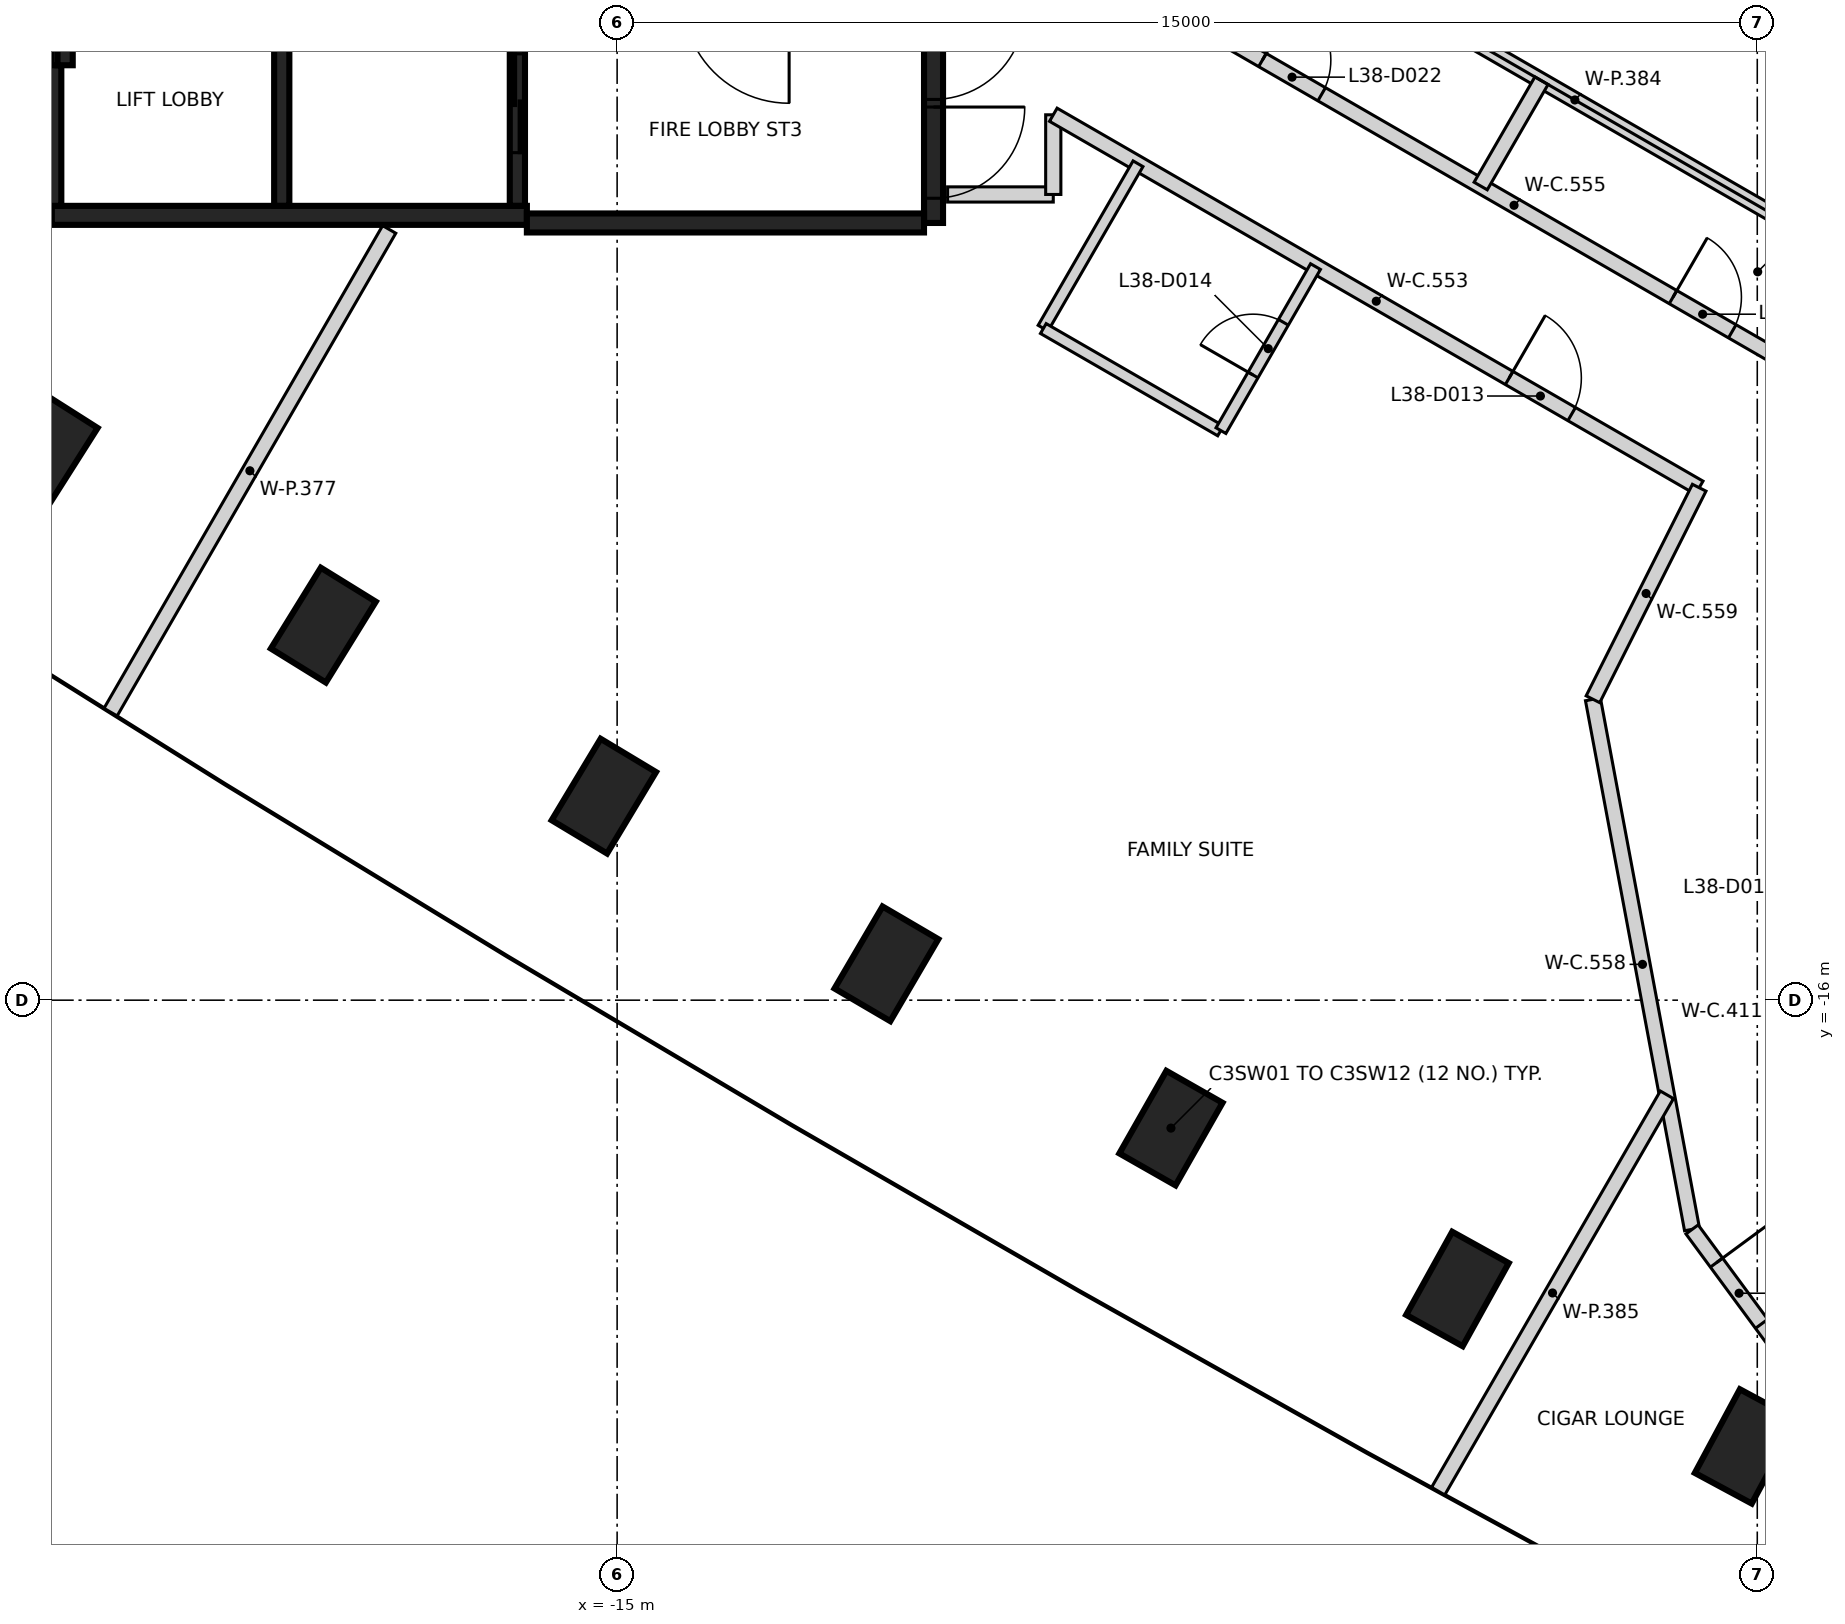
"""IFC4 building model, lengths in metres.
Left out: names, types, materials, properties, quantities, classifications, styles, units other than length and angle.
Written with IfcOpenShell. Run it as: python <this file> out.ifc"""

import sys

from ifc_helpers import new_model, si_unit, direction, frame, frame_2d, origin, origin_2d, place, context, subcontext, project, spatial, rectangle, extrude, element, fill, save


model = new_model("IFC4")
c1 = context("Model", 3, precision=1e-05, world=origin(), true_north=direction((0.0, 1.0)))
c2 = subcontext(c1, "Body", "Model", "MODEL_VIEW")
j1 = project(units=[si_unit("LENGTHUNIT", "METRE"), si_unit("PLANEANGLEUNIT", "RADIAN")], contexts=[c1])
p1 = place(None, origin())
s1 = spatial("IfcSite", under=j1, at=p1, CompositionType="ELEMENT")
p2 = place(p1, origin())
s2 = spatial("IfcBuilding", under=s1, at=p2, CompositionType="ELEMENT")
p3 = place(p2, frame((0.0, 0.0, 154.0)))
s3 = spatial("IfcBuildingStorey", under=s2, at=p3, CompositionType="ELEMENT", Elevation=154.0)
for number, where, z_axis, x_axis in (
    (1, (-22.529, -8.772, -0.4), (0.0, 0.0, 1.0), (0.536, 0.844, 0.0)),
    (2, (-18.865, -11.066, -0.4), (0.0, 0.0, 1.0), (0.526, 0.851, 0.0)),
    (3, (-15.175, -13.316, -0.4), (0.0, 0.0, 1.0), (0.515, 0.857, 0.0)),
    (4, (-11.457, -15.522, -0.4), (0.0, 0.0, 1.0), (0.505, 0.863, 0.0)),
    (5, (-7.714, -17.683, -0.4), (0.0, 0.0, 1.0), (0.495, 0.869, 0.0)),
    (6, (-3.945, -19.8, -0.4), (0.0, 0.0, 1.0), (0.485, 0.875, 0.0)),
    (7, (-0.151, -21.871, -0.4), (0.0, 0.0, 1.0), (0.474, 0.881, 0.0)),
):
    element("IfcColumn", number, at=place(p3, frame(where, z_axis=z_axis, x_axis=x_axis)), inside=s3, PredefinedType="COLUMN", context=c2, shape_type="SweptSolid", body=[
        extrude(rectangle(XDim=1.25, YDim=0.85, at=origin_2d()), origin(), (0.0, 0.0, 1.0), 3.6),
    ])
p4 = place(p3, frame((-10.837, 5.775, 0.0), z_axis=(0.0, 0.0, 1.0), x_axis=(0.0, -1.0, 0.0)))
e8 = element("IfcWall", 8, at=p4, inside=s3, PredefinedType="SHEAR", context=c2, shape_type="SweptSolid", body=[
    extrude(rectangle(XDim=11.55, YDim=0.25, at=frame_2d((5.775, 0.0))), origin(), (0.0, 0.0, 1.0), 3.2),
])
p5 = place(p4, frame((10.025, 0.0, 0.0)))
e9 = element("IfcOpeningElement", 9, at=p5, cuts=e8, PredefinedType="OPENING", context=c2, shape_type="SweptSolid", body=[
    extrude(rectangle(XDim=1.2, YDim=2.1, at=frame_2d((0.6, 1.05))), frame((0.0, 0.135, 0.0), z_axis=(0.0, -1.0, 0.0), x_axis=(1.0, 0.0, 0.0)), (0.0, 0.0, 1.0), 0.27),
])
p6 = place(p4, frame((8.725, 0.0, 0.0)))
e10 = element("IfcOpeningElement", 10, at=p6, cuts=e8, PredefinedType="OPENING", context=c2, shape_type="SweptSolid", body=[
    extrude(rectangle(XDim=1.2, YDim=2.1, at=frame_2d((0.6, 1.05))), frame((0.0, 0.135, 0.0), z_axis=(0.0, -1.0, 0.0), x_axis=(1.0, 0.0, 0.0)), (0.0, 0.0, 1.0), 0.27),
])
p7 = place(p3, frame((-16.187, -5.675, 0.0), z_axis=(0.0, 0.0, 1.0), x_axis=(-1.0, 0.0, 0.0)))
e11 = element("IfcWall", 11, at=p7, inside=s3, PredefinedType="SHEAR", context=c2, shape_type="SweptSolid", body=[
    extrude(rectangle(XDim=6.25, YDim=0.25, at=frame_2d((3.125, 0.0))), origin(), (0.0, 0.0, 1.0), 3.2),
])
p8 = place(p3, frame((-10.963, -5.775, 0.0), z_axis=(0.0, 0.0, 1.0), x_axis=(-1.0, 0.0, 0.0)))
e12 = element("IfcWall", 12, at=p8, inside=s3, PredefinedType="SHEAR", context=c2, shape_type="SweptSolid", body=[
    extrude(rectangle(XDim=5.225, YDim=0.25, at=frame_2d((2.612, 0.0))), origin(), (0.0, 0.0, 1.0), 3.2),
])
p9 = place(p3, frame((-22.437, -5.55, 0.0), z_axis=(0.0, 0.0, 1.0), x_axis=(0.0, 1.0, 0.0)))
e13 = element("IfcWall", 13, at=p9, inside=s3, PredefinedType="SHEAR", context=c2, shape_type="SweptSolid", body=[
    extrude(rectangle(XDim=1.849, YDim=0.25, at=frame_2d((0.925, 0.0))), origin(), (0.0, 0.0, 1.0), 3.2),
])
p10 = place(p3, frame((-22.262, 2.4, 0.0), z_axis=(0.0, 0.0, 1.0), x_axis=(0.0, -1.0, 0.0)))
e14 = element("IfcWall", 14, at=p10, inside=s3, PredefinedType="SHEAR", context=c2, shape_type="SweptSolid", body=[
    extrude(rectangle(XDim=6.1, YDim=0.2, at=frame_2d((3.05, 0.0))), origin(), (0.0, 0.0, 1.0), 3.2),
])
p11 = place(p3, frame((-16.312, -2.898, 0.0), z_axis=(0.0, 0.0, 1.0), x_axis=(0.0, -1.0, 0.0)))
e15 = element("IfcWall", 15, at=p11, inside=s3, PredefinedType="SHEAR", context=c2, shape_type="SweptSolid", body=[
    extrude(rectangle(XDim=2.651, YDim=0.2, at=frame_2d((1.325, 0.0))), origin(), (0.0, 0.0, 1.0), 3.2),
])
p12 = place(p11, frame((0.652, 0.0, 0.0)))
e16 = element("IfcOpeningElement", 16, at=p12, cuts=e15, PredefinedType="OPENING", context=c2, shape_type="SweptSolid", body=[
    extrude(rectangle(XDim=1.3, YDim=2.1, at=frame_2d((0.65, 1.05))), frame((0.0, 0.11, 0.0), z_axis=(0.0, -1.0, 0.0), x_axis=(1.0, 0.0, 0.0)), (0.0, 0.0, 1.0), 0.22),
])
p13 = place(p3, frame((-19.412, -5.549, 0.0), z_axis=(0.0, 0.0, 1.0), x_axis=(0.0, 1.0, 0.0)))
e17 = element("IfcWall", 17, at=p13, inside=s3, PredefinedType="SHEAR", context=c2, shape_type="SweptSolid", body=[
    extrude(rectangle(XDim=2.651, YDim=0.2, at=frame_2d((1.325, 0.0))), origin(), (0.0, 0.0, 1.0), 3.2),
])
p14 = place(p3, frame((-10.652, -5.4, 0.0), z_axis=(0.0, 0.0, 1.0), x_axis=(1.0, 0.0, 0.0)))
e18 = element("IfcWall", 18, at=p14, inside=s3, PredefinedType="PARTITIONING", context=c2, shape_type="SweptSolid", body=[
    extrude(rectangle(XDim=1.39, YDim=0.2, at=frame_2d((0.695, 0.0))), origin(), (0.0, 0.0, 1.0), 3.2),
])
p15 = place(p3, frame((-9.262, -5.4, 0.0), z_axis=(0.0, 0.0, 1.0), x_axis=(0.0, 1.0, 0.0)))
e19 = element("IfcWall", 19, at=p15, inside=s3, PredefinedType="PARTITIONING", context=c2, shape_type="SweptSolid", body=[
    extrude(rectangle(XDim=1.048, YDim=0.2, at=frame_2d((0.524, 0.0))), origin(), (0.0, 0.0, 1.0), 3.2),
])
p16 = place(p3, frame((-9.261, -4.351, 0.0), z_axis=(0.0, 0.0, 1.0), x_axis=(0.865985037707, -0.500069909581, 0.0)))
e20 = element("IfcWall", 20, at=p16, inside=s3, PredefinedType="PARTITIONING", context=c2, shape_type="SweptSolid", body=[
    extrude(rectangle(XDim=9.812, YDim=0.2, at=frame_2d((4.906, 0.0))), origin(), (0.0, 0.0, 1.0), 3.2),
])
p17 = place(p16, frame((6.925, 0.0, 0.0)))
e21 = element("IfcOpeningElement", 21, at=p17, cuts=e20, PredefinedType="OPENING", context=c2, shape_type="SweptSolid", body=[
    extrude(rectangle(XDim=0.95, YDim=2.1, at=frame_2d((0.475, 1.05))), frame((0.0, 0.11, 0.0), z_axis=(0.0, -1.0, 0.0), x_axis=(1.0, 0.0, 0.0)), (0.0, 0.0, 1.0), 0.22),
])
p18 = place(p3, frame((-8.612, -2.418, 0.0), z_axis=(0.0, 0.0, 1.0), x_axis=(0.866023916678, -0.500002575735, 0.0)))
e22 = element("IfcWall", 22, at=p18, inside=s3, PredefinedType="PARTITIONING", context=c2, shape_type="SweptSolid", body=[
    extrude(rectangle(XDim=12.499, YDim=0.2, at=frame_2d((6.249, 0.0))), origin(), (0.0, 0.0, 1.0), 3.2),
])
p19 = place(p18, frame((2.427, 0.0, 0.0)))
e23 = element("IfcOpeningElement", 23, at=p19, cuts=e22, PredefinedType="OPENING", context=c2, shape_type="SweptSolid", body=[
    extrude(rectangle(XDim=0.9, YDim=2.1, at=frame_2d((0.45, 1.05))), frame((0.0, 0.11, 0.0), z_axis=(0.0, -1.0, 0.0), x_axis=(1.0, 0.0, 0.0)), (0.0, 0.0, 1.0), 0.22),
])
p20 = place(p18, frame((8.665, 0.0, 0.0)))
e24 = element("IfcOpeningElement", 24, at=p20, cuts=e22, PredefinedType="OPENING", context=c2, shape_type="SweptSolid", body=[
    extrude(rectangle(XDim=0.9, YDim=2.1, at=frame_2d((0.45, 1.05))), frame((0.0, 0.11, 0.0), z_axis=(0.0, -1.0, 0.0), x_axis=(1.0, 0.0, 0.0)), (0.0, 0.0, 1.0), 0.22),
])
p21 = place(p3, frame((-2.162, -12.042, 0.0), z_axis=(0.0, 0.0, 1.0), x_axis=(0.18377734651, -0.982967897192, 0.0)))
e25 = element("IfcWall", 25, at=p21, inside=s3, PredefinedType="PARTITIONING", context=c2, shape_type="SweptSolid", body=[
    extrude(rectangle(XDim=7.094, YDim=0.2, at=frame_2d((3.547, 0.0))), origin(), (0.0, 0.0, 1.0), 3.2),
])
p22 = place(p3, frame((-2.162, -12.041, 0.0), z_axis=(0.0, 0.0, 1.0), x_axis=(0.448937335771, 0.893563242614, 0.0)))
e26 = element("IfcWall", 26, at=p22, inside=s3, PredefinedType="PARTITIONING", context=c2, shape_type="SweptSolid", body=[
    extrude(rectangle(XDim=3.115, YDim=0.2, at=frame_2d((1.557, 0.0))), origin(), (0.0, 0.0, 1.0), 3.2),
])
p23 = place(p3, frame((-0.858, -19.016, 0.0), z_axis=(0.0, 0.0, 1.0), x_axis=(0.593123867414, -0.805111220829, 0.0)))
e27 = element("IfcWall", 27, at=p23, inside=s3, PredefinedType="PARTITIONING", context=c2, shape_type="SweptSolid", body=[
    extrude(rectangle(XDim=2.77, YDim=0.2, at=frame_2d((1.385, 0.0))), origin(), (0.0, 0.0, 1.0), 3.2),
])
p24 = place(p23, frame((0.542, 0.0, 0.0)))
e28 = element("IfcOpeningElement", 28, at=p24, cuts=e27, PredefinedType="OPENING", context=c2, shape_type="SweptSolid", body=[
    extrude(rectangle(XDim=1.0, YDim=2.1, at=frame_2d((0.5, 1.05))), frame((0.0, 0.11, 0.0), z_axis=(0.0, -1.0, 0.0), x_axis=(1.0, 0.0, 0.0)), (0.0, 0.0, 1.0), 0.22),
])
p25 = place(p3, frame((-21.664, -12.21, 0.0), z_axis=(0.0, 0.0, 1.0), x_axis=(0.499938621367, 0.866060837855, 0.0)))
e29 = element("IfcWall", 29, at=p25, inside=s3, PredefinedType="PARTITIONING", context=c2, shape_type="SweptSolid", body=[
    extrude(rectangle(XDim=7.333, YDim=0.2, at=frame_2d((3.666, 0.0))), origin(), (0.0, 0.0, 1.0), 2.3),
])
p26 = place(p3, frame((-8.0, -0.924, 0.0), z_axis=(0.0, 0.0, 1.0), x_axis=(0.866062358179, -0.499935987647, 0.0)))
e30 = element("IfcWall", 30, at=p26, inside=s3, PredefinedType="PARTITIONING", context=c2, shape_type="SweptSolid", body=[
    extrude(rectangle(XDim=12.932, YDim=0.2, at=frame_2d((6.466, 0.0))), origin(), (0.0, 0.0, 1.0), 2.3),
])
p27 = place(p3, frame((-4.198, -22.459, 0.0), z_axis=(0.0, 0.0, 1.0), x_axis=(0.499899163109, 0.866083614164, 0.0)))
e31 = element("IfcWall", 31, at=p27, inside=s3, PredefinedType="PARTITIONING", context=c2, shape_type="SweptSolid", body=[
    extrude(rectangle(XDim=6.02, YDim=0.2, at=frame_2d((3.01, 0.0))), origin(), (0.0, 0.0, 1.0), 2.3),
])
p28 = place(p3, frame((-3.639, -5.289, 0.0), z_axis=(0.0, 0.0, 1.0), x_axis=(0.49981490623, 0.866132241352, 0.0)))
e32 = element("IfcWall", 32, at=p28, inside=s3, PredefinedType="PARTITIONING", context=c2, shape_type="SweptSolid", body=[
    extrude(rectangle(XDim=1.6, YDim=0.2, at=frame_2d((0.8, 0.0))), origin(), (0.0, 0.0, 1.0), 2.3),
])
p29 = place(p3, frame((-9.396, -7.159, 0.0), z_axis=(0.0, 0.0, 1.0), x_axis=(0.500091929049, 0.865972322018, 0.0)))
e33 = element("IfcWall", 33, at=p29, inside=s3, PredefinedType="PARTITIONING", context=c2, shape_type="SweptSolid", body=[
    extrude(rectangle(XDim=2.498, YDim=0.15, at=frame_2d((1.249, 0.0))), origin(), (0.0, 0.0, 1.0), 3.2),
])
p30 = place(p3, frame((-9.393, -7.164, 0.0), z_axis=(0.0, 0.0, 1.0), x_axis=(0.866098020528, -0.499874203012, 0.0)))
e34 = element("IfcWall", 34, at=p30, inside=s3, PredefinedType="PARTITIONING", context=c2, shape_type="SweptSolid", body=[
    extrude(rectangle(XDim=2.693, YDim=0.15, at=frame_2d((1.346, 0.0))), origin(), (0.0, 0.0, 1.0), 3.2),
])
p31 = place(p3, frame((-7.056, -8.507, 0.0), z_axis=(0.0, 0.0, 1.0), x_axis=(0.499397145068, 0.866373182582, 0.0)))
e35 = element("IfcWall", 35, at=p31, inside=s3, PredefinedType="PARTITIONING", context=c2, shape_type="SweptSolid", body=[
    extrude(rectangle(XDim=2.491, YDim=0.15, at=frame_2d((1.245, 0.0))), origin(), (0.0, 0.0, 1.0), 3.2),
])
p32 = place(p31, frame((0.845, 0.0, 0.0)))
e36 = element("IfcOpeningElement", 36, at=p32, cuts=e35, PredefinedType="OPENING", context=c2, shape_type="SweptSolid", body=[
    extrude(rectangle(XDim=0.8, YDim=2.1, at=frame_2d((0.4, 1.05))), frame((0.0, 0.085, 0.0), z_axis=(0.0, -1.0, 0.0), x_axis=(1.0, 0.0, 0.0)), (0.0, 0.0, 1.0), 0.17),
])
p33 = place(p12, origin())
e37 = element("IfcDoor", 37, at=p33, inside=s3, OperationType="SLIDING_TO_RIGHT", PredefinedType="DOOR", context=c2, shape_type="SweptSolid", body=[
    extrude(rectangle(XDim=1.3, YDim=2.1, at=frame_2d((0.65, 1.05))), frame((0.0, 0.025, 0.0), z_axis=(0.0, -1.0, 0.0), x_axis=(1.0, 0.0, 0.0)), (0.0, 0.0, 1.0), 0.05),
])
fill(e16, e37)
p34 = place(p5, origin())
e38 = element("IfcDoor", 38, at=p34, inside=s3, OperationType="SINGLE_SWING_LEFT", PredefinedType="DOOR", context=c2, shape_type="SweptSolid", body=[
    extrude(rectangle(XDim=1.2, YDim=2.1, at=frame_2d((0.6, 1.05))), frame((0.0, 0.025, 0.0), z_axis=(0.0, -1.0, 0.0), x_axis=(1.0, 0.0, 0.0)), (0.0, 0.0, 1.0), 0.05),
])
fill(e9, e38)
p35 = place(p6, origin())
e39 = element("IfcDoor", 39, at=p35, inside=s3, OperationType="SINGLE_SWING_RIGHT", PredefinedType="DOOR", context=c2, shape_type="SweptSolid", body=[
    extrude(rectangle(XDim=1.2, YDim=2.1, at=frame_2d((0.6, 1.05))), frame((0.0, 0.025, 0.0), z_axis=(0.0, -1.0, 0.0), x_axis=(1.0, 0.0, 0.0)), (0.0, 0.0, 1.0), 0.05),
])
fill(e10, e39)
p36 = place(p17, frame((0.95, 0.0, 0.0), z_axis=(0.0, 0.0, 1.0), x_axis=(-1.0, 0.0, 0.0)))
e40 = element("IfcDoor", 40, at=p36, inside=s3, OperationType="SINGLE_SWING_LEFT", PredefinedType="DOOR", context=c2, shape_type="SweptSolid", body=[
    extrude(rectangle(XDim=0.95, YDim=2.1, at=frame_2d((0.475, 1.05))), frame((0.0, 0.025, 0.0), z_axis=(0.0, -1.0, 0.0), x_axis=(1.0, 0.0, 0.0)), (0.0, 0.0, 1.0), 0.05),
])
fill(e21, e40)
p37 = place(p32, origin())
e41 = element("IfcDoor", 41, at=p37, inside=s3, OperationType="SINGLE_SWING_LEFT", PredefinedType="DOOR", context=c2, shape_type="SweptSolid", body=[
    extrude(rectangle(XDim=0.8, YDim=2.1, at=frame_2d((0.4, 1.05))), frame((0.0, 0.025, 0.0), z_axis=(0.0, -1.0, 0.0), x_axis=(1.0, 0.0, 0.0)), (0.0, 0.0, 1.0), 0.05),
])
fill(e36, e41)
p38 = place(p24, frame((1.0, 0.0, 0.0), z_axis=(0.0, 0.0, 1.0), x_axis=(-1.0, 0.0, 0.0)))
e42 = element("IfcDoor", 42, at=p38, inside=s3, OperationType="SINGLE_SWING_LEFT", PredefinedType="DOOR", context=c2, shape_type="SweptSolid", body=[
    extrude(rectangle(XDim=1.0, YDim=2.1, at=frame_2d((0.5, 1.05))), frame((0.0, 0.025, 0.0), z_axis=(0.0, -1.0, 0.0), x_axis=(1.0, 0.0, 0.0)), (0.0, 0.0, 1.0), 0.05),
])
fill(e28, e42)
p39 = place(p19, origin())
e43 = element("IfcDoor", 43, at=p39, inside=s3, OperationType="SINGLE_SWING_LEFT", PredefinedType="DOOR", context=c2, shape_type="SweptSolid", body=[
    extrude(rectangle(XDim=0.9, YDim=2.1, at=frame_2d((0.45, 1.05))), frame((0.0, 0.025, 0.0), z_axis=(0.0, -1.0, 0.0), x_axis=(1.0, 0.0, 0.0)), (0.0, 0.0, 1.0), 0.05),
])
fill(e23, e43)
p40 = place(p20, origin())
e44 = element("IfcDoor", 44, at=p40, inside=s3, OperationType="SINGLE_SWING_LEFT", PredefinedType="DOOR", context=c2, shape_type="SweptSolid", body=[
    extrude(rectangle(XDim=0.9, YDim=2.1, at=frame_2d((0.45, 1.05))), frame((0.0, 0.025, 0.0), z_axis=(0.0, -1.0, 0.0), x_axis=(1.0, 0.0, 0.0)), (0.0, 0.0, 1.0), 0.05),
])
fill(e24, e44)
save(model, sys.argv[1])
